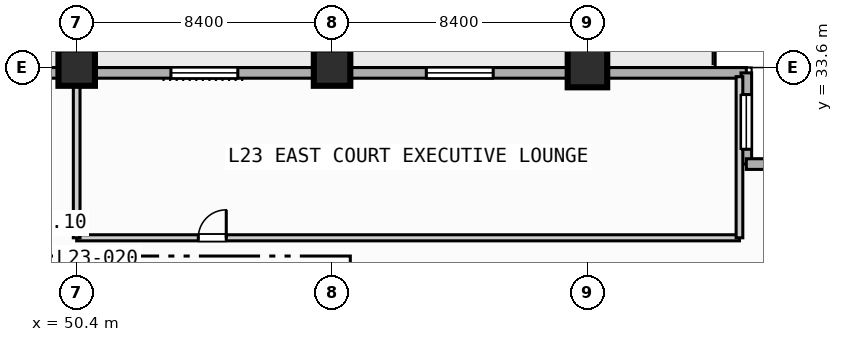
"""IFC4 building model, lengths in metres.
Left out: names, types, materials, properties, quantities, classifications, styles, units other than length and angle.
Written with IfcOpenShell. Run it as: python <this file> out.ifc"""

import sys

from ifc_helpers import new_model, si_unit, direction, frame, frame_2d, origin, origin_2d, place, context, subcontext, project, spatial, rectangle, extrude, element, fill, save


model = new_model("IFC4")
c1 = context("Model", 3, precision=1e-05, world=origin(), true_north=direction((0.0, 1.0)))
c2 = subcontext(c1, "Body", "Model", "MODEL_VIEW")
j1 = project(units=[si_unit("LENGTHUNIT", "METRE"), si_unit("PLANEANGLEUNIT", "RADIAN")], contexts=[c1])
p1 = place(None, origin())
s1 = spatial("IfcSite", under=j1, at=p1, CompositionType="ELEMENT")
p2 = place(p1, origin())
s2 = spatial("IfcBuilding", under=s1, at=p2, CompositionType="ELEMENT")
p3 = place(p2, frame((0.0, 0.0, 100.0)))
s3 = spatial("IfcBuildingStorey", under=s2, at=p3, CompositionType="ELEMENT", Elevation=100.0)
for number, where, z_axis, x_axis in (
    (1, (50.4, 33.6, 0.0), (0.0, 0.0, 1.0), (1.0, 0.0, 0.0)),
    (2, (58.8, 33.6, 0.0), (0.0, 0.0, 1.0), (1.0, 0.0, 0.0)),
):
    element("IfcColumn", number, at=place(p3, frame(where, z_axis=z_axis, x_axis=x_axis)), inside=s3, PredefinedType="COLUMN", context=c2, shape_type="SweptSolid", body=[
        extrude(rectangle(XDim=1.2, YDim=1.2, at=origin_2d()), origin(), (0.0, 0.0, 1.0), 3.8),
    ])
p4 = place(p3, frame((67.2, 33.6, 0.0), z_axis=(0.0, 0.0, 1.0), x_axis=(1.0, 0.0, 0.0)))
e3 = element("IfcColumn", 3, at=p4, inside=s3, PredefinedType="COLUMN", context=c2, shape_type="SweptSolid", body=[
    extrude(rectangle(XDim=1.3, YDim=1.3, at=origin_2d()), origin(), (0.0, 0.0, 1.0), 3.8),
])
p5 = place(p3, frame((33.425, 33.425, 0.0), z_axis=(0.0, 0.0, 1.0), x_axis=(1.0, 0.0, 0.0)))
e4 = element("IfcWall", 4, at=p5, inside=s3, PredefinedType="STANDARD", context=c2, shape_type="SweptSolid", body=[
    extrude(rectangle(XDim=39.0, YDim=0.35, at=frame_2d((19.5, 0.0))), origin(), (0.0, 0.0, 1.0), 3.55),
])
p6 = place(p5, frame((12.075, 0.0, 0.0)))
e5 = element("IfcOpeningElement", 5, at=p6, cuts=e4, PredefinedType="OPENING", context=c2, shape_type="SweptSolid", body=[
    extrude(rectangle(XDim=1.4, YDim=2.2, at=frame_2d((0.7, 1.1))), frame((0.0, 0.185, 0.0), z_axis=(0.0, -1.0, 0.0), x_axis=(1.0, 0.0, 0.0)), (0.0, 0.0, 1.0), 0.37),
])
p7 = place(p5, frame((20.075, 0.0, 0.85)))
e6 = element("IfcOpeningElement", 6, at=p7, cuts=e4, PredefinedType="OPENING", context=c2, shape_type="SweptSolid", body=[
    extrude(rectangle(XDim=2.2, YDim=1.8, at=frame_2d((1.1, 0.9))), frame((0.0, 0.185, 0.0), z_axis=(0.0, -1.0, 0.0), x_axis=(1.0, 0.0, 0.0)), (0.0, 0.0, 1.0), 0.37),
])
p8 = place(p5, frame((28.475, 0.0, 0.85)))
e7 = element("IfcOpeningElement", 7, at=p8, cuts=e4, PredefinedType="OPENING", context=c2, shape_type="SweptSolid", body=[
    extrude(rectangle(XDim=2.2, YDim=1.8, at=frame_2d((1.1, 0.9))), frame((0.0, 0.185, 0.0), z_axis=(0.0, -1.0, 0.0), x_axis=(1.0, 0.0, 0.0)), (0.0, 0.0, 1.0), 0.37),
])
p9 = place(p3, frame((72.425, 33.425, 0.0), z_axis=(0.0, 0.0, 1.0), x_axis=(0.0, -1.0, 0.0)))
e8 = element("IfcWall", 8, at=p9, inside=s3, PredefinedType="STANDARD", context=c2, shape_type="SweptSolid", body=[
    extrude(rectangle(XDim=3.0, YDim=0.35, at=frame_2d((1.5, 0.0))), origin(), (0.0, 0.0, 1.0), 3.55),
])
p10 = place(p9, frame((0.712, 0.0, 0.85)))
e9 = element("IfcOpeningElement", 9, at=p10, cuts=e8, PredefinedType="OPENING", context=c2, shape_type="SweptSolid", body=[
    extrude(rectangle(XDim=1.8, YDim=1.8, at=frame_2d((0.9, 0.9))), frame((0.0, 0.185, 0.0), z_axis=(0.0, -1.0, 0.0), x_axis=(1.0, 0.0, 0.0)), (0.0, 0.0, 1.0), 0.37),
])
p11 = place(p3, frame((72.425, 30.425, 0.0), z_axis=(0.0, 0.0, 1.0), x_axis=(1.0, 0.0, 0.0)))
e10 = element("IfcWall", 10, at=p11, inside=s3, PredefinedType="STANDARD", context=c2, shape_type="SweptSolid", body=[
    extrude(rectangle(XDim=3.0, YDim=0.35, at=frame_2d((1.5, 0.0))), origin(), (0.0, 0.0, 1.0), 3.55),
])
p12 = place(p3, frame((50.4, 28.0, 0.0), z_axis=(0.0, 0.0, 1.0), x_axis=(1.0, 0.0, 0.0)))
e11 = element("IfcWall", 11, at=p12, inside=s3, PredefinedType="PARTITIONING", context=c2, shape_type="SweptSolid", body=[
    extrude(rectangle(XDim=21.8, YDim=0.2, at=frame_2d((10.9, 0.0))), origin(), (0.0, 0.0, 1.0), 3.55),
])
p13 = place(p12, frame((4.0, 0.0, 0.0)))
e12 = element("IfcOpeningElement", 12, at=p13, cuts=e11, PredefinedType="OPENING", context=c2, shape_type="SweptSolid", body=[
    extrude(rectangle(XDim=0.92, YDim=2.1, at=frame_2d((0.46, 1.05))), frame((0.0, 0.11, 0.0), z_axis=(0.0, -1.0, 0.0), x_axis=(1.0, 0.0, 0.0)), (0.0, 0.0, 1.0), 0.22),
])
p14 = place(p3, frame((50.4, 28.0, 0.0), z_axis=(0.0, 0.0, 1.0), x_axis=(0.0, 1.0, 0.0)))
e13 = element("IfcWall", 13, at=p14, inside=s3, PredefinedType="PARTITIONING", context=c2, shape_type="SweptSolid", body=[
    extrude(rectangle(XDim=5.3, YDim=0.22, at=frame_2d((2.65, 0.0))), origin(), (0.0, 0.0, 1.0), 3.087),
])
p15 = place(p3, frame((72.2, 28.0, 0.0), z_axis=(0.0, 0.0, 1.0), x_axis=(0.0, 1.0, 0.0)))
e14 = element("IfcWall", 14, at=p15, inside=s3, PredefinedType="PARTITIONING", context=c2, shape_type="SweptSolid", body=[
    extrude(rectangle(XDim=5.3, YDim=0.22, at=frame_2d((2.65, 0.0))), origin(), (0.0, 0.0, 1.0), 3.55),
])
p16 = place(p7, origin())
e15 = element("IfcWindow", 15, at=p16, inside=s3, PartitioningType="SINGLE_PANEL", PredefinedType="WINDOW", context=c2, shape_type="SweptSolid", body=[
    extrude(rectangle(XDim=2.2, YDim=1.8, at=frame_2d((1.1, 0.9))), frame((0.0, 0.03, 0.0), z_axis=(0.0, -1.0, 0.0), x_axis=(1.0, 0.0, 0.0)), (0.0, 0.0, 1.0), 0.06),
])
fill(e6, e15)
p17 = place(p8, origin())
e16 = element("IfcWindow", 16, at=p17, inside=s3, PartitioningType="SINGLE_PANEL", PredefinedType="WINDOW", context=c2, shape_type="SweptSolid", body=[
    extrude(rectangle(XDim=2.2, YDim=1.8, at=frame_2d((1.1, 0.9))), frame((0.0, 0.03, 0.0), z_axis=(0.0, -1.0, 0.0), x_axis=(1.0, 0.0, 0.0)), (0.0, 0.0, 1.0), 0.06),
])
fill(e7, e16)
p18 = place(p10, origin())
e17 = element("IfcWindow", 17, at=p18, inside=s3, PartitioningType="SINGLE_PANEL", PredefinedType="WINDOW", context=c2, shape_type="SweptSolid", body=[
    extrude(rectangle(XDim=1.8, YDim=1.8, at=frame_2d((0.9, 0.9))), frame((0.0, 0.03, 0.0), z_axis=(0.0, -1.0, 0.0), x_axis=(1.0, 0.0, 0.0)), (0.0, 0.0, 1.0), 0.06),
])
fill(e9, e17)
p19 = place(p13, origin())
e18 = element("IfcDoor", 18, at=p19, inside=s3, OperationType="SINGLE_SWING_RIGHT", PredefinedType="DOOR", context=c2, shape_type="SweptSolid", body=[
    extrude(rectangle(XDim=0.92, YDim=2.1, at=frame_2d((0.46, 1.05))), frame((0.0, 0.025, 0.0), z_axis=(0.0, -1.0, 0.0), x_axis=(1.0, 0.0, 0.0)), (0.0, 0.0, 1.0), 0.05),
])
fill(e12, e18)
save(model, sys.argv[1])
